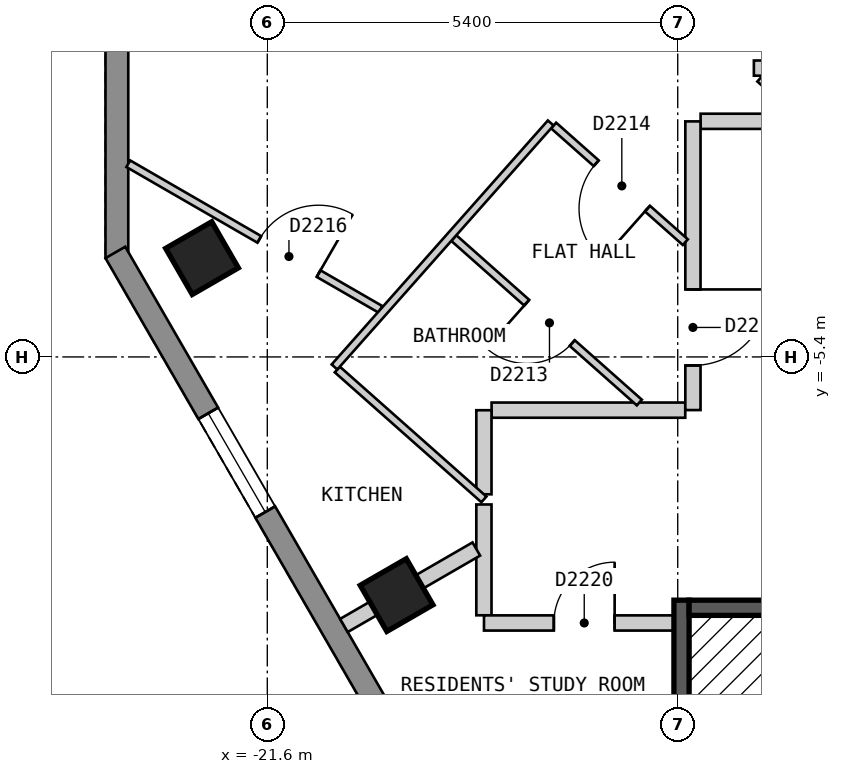
"""IFC4 building model, lengths in metres.
Left out: names, types, materials, properties, quantities, classifications, styles, units other than length and angle.
Written with IfcOpenShell. Run it as: python <this file> out.ifc"""

import sys

from ifc_helpers import new_model, si_unit, direction, frame, frame_2d, origin, origin_2d, place, context, subcontext, project, spatial, polyline, rectangle, outline, extrude, element, fill, save


model = new_model("IFC4")
c1 = context("Model", 3, precision=1e-05, world=origin(), true_north=direction((0.0, 1.0)))
c2 = subcontext(c1, "Body", "Model", "MODEL_VIEW")
j1 = project(units=[si_unit("LENGTHUNIT", "METRE"), si_unit("PLANEANGLEUNIT", "RADIAN")], contexts=[c1])
p1 = place(None, origin())
s1 = spatial("IfcSite", under=j1, at=p1, CompositionType="ELEMENT")
p2 = place(p1, origin())
s2 = spatial("IfcBuilding", under=s1, at=p2, CompositionType="ELEMENT")
p3 = place(p2, frame((0.0, 0.0, 235.8)))
s3 = spatial("IfcBuildingStorey", under=s2, at=p3, CompositionType="ELEMENT", Elevation=235.8)
for number, where, z_axis, x_axis in (
    (1, (-22.459, -4.1, 0.0), (0.0, 0.0, 1.0), (0.5, -0.866, 0.0)),
    (2, (-19.899, -8.533, 0.0), (0.0, 0.0, 1.0), (0.5, -0.866, 0.0)),
):
    element("IfcColumn", number, at=place(p3, frame(where, z_axis=z_axis, x_axis=x_axis)), inside=s3, PredefinedType="COLUMN", context=c2, shape_type="SweptSolid", body=[
        extrude(rectangle(XDim=0.7, YDim=0.7, at=origin_2d()), origin(), (0.0, 0.0, 1.0), 3.0),
    ])
p4 = place(p3, frame((-23.579, 0.9, 0.0), z_axis=(0.0, 0.0, 1.0), x_axis=(0.0, -1.0, 0.0)))
e3 = element("IfcWall", 3, at=p4, inside=s3, PredefinedType="SOLIDWALL", context=c2, shape_type="SweptSolid", body=[
    extrude(outline(polyline([(0.0, -0.15), (5.0, -0.15), (4.92, 0.15), (0.08, 0.15), (0.0, -0.15)])), origin(), (0.0, 0.0, 1.0), 2.7),
])
p5 = place(p4, frame((0.65, 0.0, 0.15)))
e4 = element("IfcOpeningElement", 4, at=p5, cuts=e3, PredefinedType="OPENING", context=c2, shape_type="SweptSolid", body=[
    extrude(rectangle(XDim=1.2, YDim=2.1, at=frame_2d((0.6, 1.05))), frame((0.0, 0.16, 0.0), z_axis=(0.0, -1.0, 0.0), x_axis=(1.0, 0.0, 0.0)), (0.0, 0.0, 1.0), 0.32),
])
p6 = place(p3, frame((-23.599, -4.025, 0.0), z_axis=(0.0, 0.0, 1.0), x_axis=(0.500012653391, -0.866018098222, 0.0)))
e5 = element("IfcWall", 5, at=p6, inside=s3, PredefinedType="SOLIDWALL", context=c2, shape_type="SweptSolid", body=[
    extrude(outline(polyline([(0.0, -0.15), (16.628, -0.15), (16.548, 0.15), (0.08, 0.15), (0.0, -0.15)])), origin(), (0.0, 0.0, 1.0), 2.7),
])
p7 = place(p6, frame((2.444, 0.0, 0.15)))
e6 = element("IfcOpeningElement", 6, at=p7, cuts=e5, PredefinedType="OPENING", context=c2, shape_type="SweptSolid", body=[
    extrude(rectangle(XDim=1.5, YDim=2.1, at=frame_2d((0.75, 1.05))), frame((0.0, 0.16, 0.0), z_axis=(0.0, -1.0, 0.0), x_axis=(1.0, 0.0, 0.0)), (0.0, 0.0, 1.0), 0.32),
])
p8 = place(p6, frame((7.564, 0.0, 0.15)))
e7 = element("IfcOpeningElement", 7, at=p8, cuts=e5, PredefinedType="OPENING", context=c2, shape_type="SweptSolid", body=[
    extrude(rectangle(XDim=1.5, YDim=2.1, at=frame_2d((0.75, 1.05))), frame((0.0, 0.16, 0.0), z_axis=(0.0, -1.0, 0.0), x_axis=(1.0, 0.0, 0.0)), (0.0, 0.0, 1.0), 0.32),
])
p9 = place(p6, frame((12.682, 0.0, 0.15)))
e8 = element("IfcOpeningElement", 8, at=p9, cuts=e5, PredefinedType="OPENING", context=c2, shape_type="SweptSolid", body=[
    extrude(rectangle(XDim=1.5, YDim=2.1, at=frame_2d((0.75, 1.05))), frame((0.0, 0.16, 0.0), z_axis=(0.0, -1.0, 0.0), x_axis=(1.0, 0.0, 0.0)), (0.0, 0.0, 1.0), 0.32),
])
p10 = place(p3, frame((-18.75, -7.341, 0.0), z_axis=(0.0, 0.0, 1.0), x_axis=(0.0, -1.0, 0.0)))
e9 = element("IfcWall", 9, at=p10, inside=s3, PredefinedType="PARTITIONING", context=c2, shape_type="SweptSolid", body=[
    extrude(rectangle(XDim=1.458, YDim=0.2, at=frame_2d((0.729, 0.0))), origin(), (0.0, 0.0, 1.0), 2.7),
])
p11 = place(p3, frame((-18.649, -6.1, 0.0), z_axis=(0.0, 0.0, 1.0), x_axis=(1.0, 0.0, 0.0)))
e10 = element("IfcWall", 10, at=p11, inside=s3, PredefinedType="PARTITIONING", context=c2, shape_type="SweptSolid", body=[
    extrude(rectangle(XDim=2.548, YDim=0.2, at=frame_2d((1.274, 0.0))), origin(), (0.0, 0.0, 1.0), 2.7),
])
p12 = place(p3, frame((-18.749, -8.9, 0.0), z_axis=(0.0, 0.0, 1.0), x_axis=(1.0, 0.0, 0.0)))
e11 = element("IfcWall", 11, at=p12, inside=s3, PredefinedType="PARTITIONING", context=c2, shape_type="SweptSolid", body=[
    extrude(rectangle(XDim=2.699, YDim=0.2, at=frame_2d((1.35, 0.0))), origin(), (0.0, 0.0, 1.0), 2.7),
])
p13 = place(p12, frame((0.919, 0.0, 0.0)))
e12 = element("IfcOpeningElement", 12, at=p13, cuts=e11, PredefinedType="OPENING", context=c2, shape_type="SweptSolid", body=[
    extrude(rectangle(XDim=0.8, YDim=2.1, at=frame_2d((0.4, 1.05))), frame((0.0, 0.11, 0.0), z_axis=(0.0, -1.0, 0.0), x_axis=(1.0, 0.0, 0.0)), (0.0, 0.0, 1.0), 0.22),
])
p14 = place(p3, frame((-15.899, -2.3, 0.0), z_axis=(0.0, 0.0, 1.0), x_axis=(1.0, 0.0, 0.0)))
e13 = element("IfcWall", 13, at=p14, inside=s3, PredefinedType="PARTITIONING", context=c2, shape_type="SweptSolid", body=[
    extrude(rectangle(XDim=1.337, YDim=0.2, at=frame_2d((0.668, 0.0))), origin(), (0.0, 0.0, 1.0), 2.7),
])
p15 = place(p3, frame((-16.0, -6.099, 0.0), z_axis=(0.0, 0.0, 1.0), x_axis=(0.0, 1.0, 0.0)))
e14 = element("IfcWall", 14, at=p15, inside=s3, PredefinedType="PARTITIONING", context=c2, shape_type="SweptSolid", body=[
    extrude(rectangle(XDim=3.798, YDim=0.2, at=frame_2d((1.899, 0.0))), origin(), (0.0, 0.0, 1.0), 2.7),
])
p16 = place(p15, frame((0.587, 0.0, 0.0)))
e15 = element("IfcOpeningElement", 15, at=p16, cuts=e14, PredefinedType="OPENING", context=c2, shape_type="SweptSolid", body=[
    extrude(rectangle(XDim=1.0, YDim=2.1, at=frame_2d((0.5, 1.05))), frame((0.0, 0.11, 0.0), z_axis=(0.0, -1.0, 0.0), x_axis=(1.0, 0.0, 0.0)), (0.0, 0.0, 1.0), 0.22),
])
p17 = place(p3, frame((-18.75, -7.207, 0.0), z_axis=(0.0, 0.0, 1.0), x_axis=(0.0, 1.0, 0.0)))
e16 = element("IfcWall", 16, at=p17, inside=s3, PredefinedType="PARTITIONING", context=c2, shape_type="SweptSolid", body=[
    extrude(rectangle(XDim=1.106, YDim=0.2, at=frame_2d((0.553, 0.0))), origin(), (0.0, 0.0, 1.0), 2.7),
])
p18 = place(p3, frame((-23.429, -2.858, 0.0), z_axis=(0.0, 0.0, 1.0), x_axis=(0.8659754619, -0.500086491905, 0.0)))
e17 = element("IfcWall", 17, at=p18, inside=s3, PredefinedType="PARTITIONING", context=c2, shape_type="SweptSolid", body=[
    extrude(rectangle(XDim=3.831, YDim=0.1, at=frame_2d((1.916, 0.0))), origin(), (0.0, 0.0, 1.0), 2.7),
])
p19 = place(p18, frame((1.991, 0.0, 0.0)))
e18 = element("IfcOpeningElement", 18, at=p19, cuts=e17, PredefinedType="OPENING", context=c2, shape_type="SweptSolid", body=[
    extrude(rectangle(XDim=0.9, YDim=2.1, at=frame_2d((0.45, 1.05))), frame((0.0, 0.06, 0.0), z_axis=(0.0, -1.0, 0.0), x_axis=(1.0, 0.0, 0.0)), (0.0, 0.0, 1.0), 0.12),
])
p20 = place(p3, frame((-17.833, -2.355, 0.0), z_axis=(0.0, 0.0, 1.0), x_axis=(0.748577710953, -0.663047065196, 0.0)))
e19 = element("IfcWall", 19, at=p20, inside=s3, PredefinedType="PARTITIONING", context=c2, shape_type="SweptSolid", body=[
    extrude(rectangle(XDim=2.315, YDim=0.1, at=frame_2d((1.157, 0.0))), origin(), (0.0, 0.0, 1.0), 2.7),
])
p21 = place(p20, frame((0.749, 0.0, 0.0)))
e20 = element("IfcOpeningElement", 20, at=p21, cuts=e19, PredefinedType="OPENING", context=c2, shape_type="SweptSolid", body=[
    extrude(rectangle(XDim=0.9, YDim=2.1, at=frame_2d((0.45, 1.05))), frame((0.0, 0.06, 0.0), z_axis=(0.0, -1.0, 0.0), x_axis=(1.0, 0.0, 0.0)), (0.0, 0.0, 1.0), 0.12),
])
p22 = place(p3, frame((-19.146, -3.836, 0.0), z_axis=(0.0, 0.0, 1.0), x_axis=(0.748267567437, -0.663397051186, 0.0)))
e21 = element("IfcWall", 21, at=p22, inside=s3, PredefinedType="PARTITIONING", context=c2, shape_type="SweptSolid", body=[
    extrude(rectangle(XDim=3.262, YDim=0.1, at=frame_2d((1.631, 0.0))), origin(), (0.0, 0.0, 1.0), 2.7),
])
p23 = place(p22, frame((1.282, 0.0, 0.0)))
e22 = element("IfcOpeningElement", 22, at=p23, cuts=e21, PredefinedType="OPENING", context=c2, shape_type="SweptSolid", body=[
    extrude(rectangle(XDim=0.8, YDim=2.1, at=frame_2d((0.4, 1.05))), frame((0.0, 0.06, 0.0), z_axis=(0.0, -1.0, 0.0), x_axis=(1.0, 0.0, 0.0)), (0.0, 0.0, 1.0), 0.12),
])
p24 = place(p3, frame((-20.679, -5.565, 0.0), z_axis=(0.0, 0.0, 1.0), x_axis=(0.748495475416, -0.663139897217, 0.0)))
e23 = element("IfcWall", 23, at=p24, inside=s3, PredefinedType="PARTITIONING", context=c2, shape_type="SweptSolid", body=[
    extrude(rectangle(XDim=2.577, YDim=0.1, at=frame_2d((1.289, 0.0))), origin(), (0.0, 0.0, 1.0), 2.7),
])
p25 = place(p3, frame((-20.716, -5.532, 0.0), z_axis=(0.0, 0.0, 1.0), x_axis=(0.663278535613, 0.748372623895, 0.0)))
e24 = element("IfcWall", 24, at=p25, inside=s3, PredefinedType="PARTITIONING", context=c2, shape_type="SweptSolid", body=[
    extrude(rectangle(XDim=4.289, YDim=0.1, at=frame_2d((2.145, 0.0))), origin(), (0.0, 0.0, 1.0), 2.7),
])
p26 = place(p3, frame((-15.086, -1.702, 0.0), z_axis=(0.0, 0.0, 1.0), x_axis=(0.748305129876, -0.663354680846, 0.0)))
e25 = element("IfcWall", 25, at=p26, inside=s3, PredefinedType="PARTITIONING", context=c2, shape_type="SweptSolid", body=[
    extrude(rectangle(XDim=0.856, YDim=0.2, at=frame_2d((0.428, 0.0))), origin(), (0.0, 0.0, 1.0), 2.7),
])
p27 = place(p3, frame((-15.198, -1.6, 0.0), z_axis=(0.0, 0.0, 1.0), x_axis=(1.0, 0.0, 0.0)))
e26 = element("IfcWall", 26, at=p27, inside=s3, PredefinedType="PARTITIONING", context=c2, shape_type="SweptSolid", body=[
    extrude(rectangle(XDim=2.005, YDim=0.2, at=frame_2d((1.002, 0.0))), origin(), (0.0, 0.0, 1.0), 2.7),
])
p28 = place(p3, frame((-20.592, -8.933, 0.0), z_axis=(0.0, 0.0, 1.0), x_axis=(0.865941000796, 0.500146161777, 0.0)))
e27 = element("IfcWall", 27, at=p28, inside=s3, PredefinedType="PARTITIONING", context=c2, shape_type="SweptSolid", body=[
    extrude(rectangle(XDim=2.012, YDim=0.2, at=frame_2d((1.006, 0.0))), origin(), (0.0, 0.0, 1.0), 2.7),
])
p29 = place(p3, frame((-16.15, -14.4, 0.0), z_axis=(0.0, 0.0, 1.0), x_axis=(0.0, 1.0, 0.0)))
e28 = element("IfcWall", 28, at=p29, inside=s3, PredefinedType="SOLIDWALL", context=c2, shape_type="SweptSolid", body=[
    extrude(rectangle(XDim=5.8, YDim=0.2, at=frame_2d((2.9, 0.0))), origin(), (0.0, 0.0, 1.0), 2.7),
])
p30 = place(p3, frame((-16.05, -8.7, 0.0), z_axis=(0.0, 0.0, 1.0), x_axis=(1.0, 0.0, 0.0)))
e29 = element("IfcWall", 29, at=p30, inside=s3, PredefinedType="SOLIDWALL", context=c2, shape_type="SweptSolid", body=[
    extrude(rectangle(XDim=2.75, YDim=0.2, at=frame_2d((1.375, 0.0))), origin(), (0.0, 0.0, 1.0), 2.7),
])
p31 = place(p7, origin())
e30 = element("IfcWindow", 30, at=p31, inside=s3, PartitioningType="SINGLE_PANEL", PredefinedType="WINDOW", context=c2, shape_type="SweptSolid", body=[
    extrude(rectangle(XDim=1.5, YDim=2.1, at=frame_2d((0.75, 1.05))), frame((0.0, 0.03, 0.0), z_axis=(0.0, -1.0, 0.0), x_axis=(1.0, 0.0, 0.0)), (0.0, 0.0, 1.0), 0.06),
])
fill(e6, e30)
p32 = place(p16, origin())
e31 = element("IfcDoor", 31, at=p32, inside=s3, OperationType="SINGLE_SWING_RIGHT", PredefinedType="DOOR", context=c2, shape_type="SweptSolid", body=[
    extrude(rectangle(XDim=1.0, YDim=2.1, at=frame_2d((0.5, 1.05))), frame((0.0, 0.025, 0.0), z_axis=(0.0, -1.0, 0.0), x_axis=(1.0, 0.0, 0.0)), (0.0, 0.0, 1.0), 0.05),
])
fill(e15, e31)
p33 = place(p23, origin())
e32 = element("IfcDoor", 32, at=p33, inside=s3, OperationType="SINGLE_SWING_LEFT", PredefinedType="DOOR", context=c2, shape_type="SweptSolid", body=[
    extrude(rectangle(XDim=0.8, YDim=2.1, at=frame_2d((0.4, 1.05))), frame((0.0, 0.025, 0.0), z_axis=(0.0, -1.0, 0.0), x_axis=(1.0, 0.0, 0.0)), (0.0, 0.0, 1.0), 0.05),
])
fill(e22, e32)
p34 = place(p21, origin())
e33 = element("IfcDoor", 33, at=p34, inside=s3, OperationType="SINGLE_SWING_RIGHT", PredefinedType="DOOR", context=c2, shape_type="SweptSolid", body=[
    extrude(rectangle(XDim=0.9, YDim=2.1, at=frame_2d((0.45, 1.05))), frame((0.0, 0.025, 0.0), z_axis=(0.0, -1.0, 0.0), x_axis=(1.0, 0.0, 0.0)), (0.0, 0.0, 1.0), 0.05),
])
fill(e20, e33)
p35 = place(p19, origin())
e34 = element("IfcDoor", 34, at=p35, inside=s3, OperationType="SINGLE_SWING_RIGHT", PredefinedType="DOOR", context=c2, shape_type="SweptSolid", body=[
    extrude(rectangle(XDim=0.9, YDim=2.1, at=frame_2d((0.45, 1.05))), frame((0.0, 0.025, 0.0), z_axis=(0.0, -1.0, 0.0), x_axis=(1.0, 0.0, 0.0)), (0.0, 0.0, 1.0), 0.05),
])
fill(e18, e34)
p36 = place(p13, origin())
e35 = element("IfcDoor", 35, at=p36, inside=s3, OperationType="SINGLE_SWING_RIGHT", PredefinedType="DOOR", context=c2, shape_type="SweptSolid", body=[
    extrude(rectangle(XDim=0.8, YDim=2.1, at=frame_2d((0.4, 1.05))), frame((0.0, 0.025, 0.0), z_axis=(0.0, -1.0, 0.0), x_axis=(1.0, 0.0, 0.0)), (0.0, 0.0, 1.0), 0.05),
])
fill(e12, e35)
save(model, sys.argv[1])
